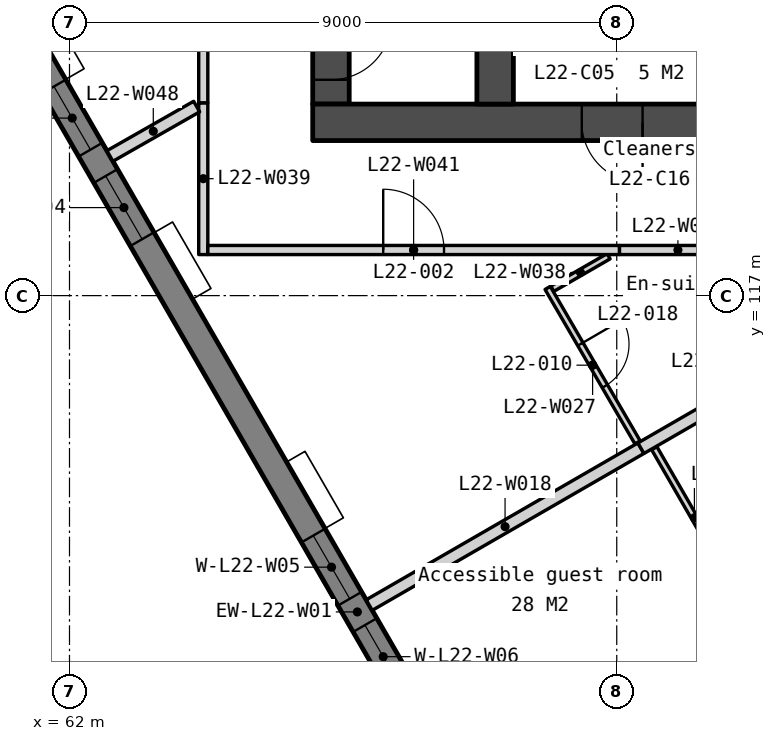
"""IFC4 building model, lengths in metres.
Left out: names, types, materials, properties, quantities, classifications, styles, units other than length and angle.
Written with IfcOpenShell. Run it as: python <this file> out.ifc"""

import sys

from ifc_helpers import new_model, si_unit, direction, frame, frame_2d, origin, place, context, subcontext, project, spatial, polyline, rectangle, outline, extrude, element, fill, save


model = new_model("IFC4")
c1 = context("Model", 3, precision=1e-05, world=origin(), true_north=direction((0.0, 1.0)))
c2 = subcontext(c1, "Body", "Model", "MODEL_VIEW")
j1 = project(units=[si_unit("LENGTHUNIT", "METRE"), si_unit("PLANEANGLEUNIT", "RADIAN")], contexts=[c1])
p1 = place(None, origin())
s1 = spatial("IfcSite", under=j1, at=p1, CompositionType="ELEMENT")
p2 = place(p1, origin())
s2 = spatial("IfcBuilding", under=s1, at=p2, CompositionType="ELEMENT")
p3 = place(p2, frame((0.0, 0.0, 92.3)))
s3 = spatial("IfcBuildingStorey", under=s2, at=p3, CompositionType="ELEMENT", Elevation=92.3)
p4 = place(p3, frame((66.3, 133.95, 0.0), z_axis=(0.0, 0.0, 1.0), x_axis=(0.0, -1.0, 0.0)))
e1 = element("IfcWall", 1, at=p4, inside=s3, PredefinedType="SOLIDWALL", context=c2, shape_type="SweptSolid", body=[
    extrude(rectangle(XDim=13.8, YDim=0.6, at=frame_2d((6.9, 0.0))), origin(), (0.0, 0.0, 1.0), 3.35),
])
p5 = place(p4, frame((0.6, 0.0, 0.0)))
e2 = element("IfcOpeningElement", 2, at=p5, cuts=e1, PredefinedType="OPENING", context=c2, shape_type="SweptSolid", body=[
    extrude(rectangle(XDim=1.1, YDim=2.1, at=frame_2d((0.55, 1.05))), frame((0.0, 0.31, 0.0), z_axis=(0.0, -1.0, 0.0), x_axis=(1.0, 0.0, 0.0)), (0.0, 0.0, 1.0), 0.62),
])
p6 = place(p4, frame((12.4, 0.0, 0.0)))
e3 = element("IfcOpeningElement", 3, at=p6, cuts=e1, PredefinedType="OPENING", context=c2, shape_type="SweptSolid", body=[
    extrude(rectangle(XDim=1.0, YDim=2.1, at=frame_2d((0.5, 1.05))), frame((0.0, 0.31, 0.0), z_axis=(0.0, -1.0, 0.0), x_axis=(1.0, 0.0, 0.0)), (0.0, 0.0, 1.0), 0.62),
])
p7 = place(p4, frame((8.5, 0.0, 0.0)))
e4 = element("IfcOpeningElement", 4, at=p7, cuts=e1, PredefinedType="OPENING", context=c2, shape_type="SweptSolid", body=[
    extrude(rectangle(XDim=1.0, YDim=2.1, at=frame_2d((0.5, 1.05))), frame((0.0, 0.31, 0.0), z_axis=(0.0, -1.0, 0.0), x_axis=(1.0, 0.0, 0.0)), (0.0, 0.0, 1.0), 0.62),
])
p8 = place(p4, frame((10.45, 0.0, 0.0)))
e5 = element("IfcOpeningElement", 5, at=p8, cuts=e1, PredefinedType="OPENING", context=c2, shape_type="SweptSolid", body=[
    extrude(rectangle(XDim=1.0, YDim=2.1, at=frame_2d((0.5, 1.05))), frame((0.0, 0.31, 0.0), z_axis=(0.0, -1.0, 0.0), x_axis=(1.0, 0.0, 0.0)), (0.0, 0.0, 1.0), 0.62),
])
p9 = place(p3, frame((66.0, 119.85, 0.0), z_axis=(0.0, 0.0, 1.0), x_axis=(1.0, 0.0, 0.0)))
e6 = element("IfcWall", 6, at=p9, inside=s3, PredefinedType="SOLIDWALL", context=c2, shape_type="SweptSolid", body=[
    extrude(rectangle(XDim=28.0, YDim=0.6, at=frame_2d((14.0, 0.0))), origin(), (0.0, 0.0, 1.0), 3.35),
])
p10 = place(p9, frame((6.825, 0.0, 0.0)))
e7 = element("IfcOpeningElement", 7, at=p10, cuts=e6, PredefinedType="OPENING", context=c2, shape_type="SweptSolid", body=[
    extrude(rectangle(XDim=1.8, YDim=2.1, at=frame_2d((0.9, 1.05))), frame((0.0, 0.31, 0.0), z_axis=(0.0, -1.0, 0.0), x_axis=(1.0, 0.0, 0.0)), (0.0, 0.0, 1.0), 0.62),
])
p11 = place(p9, frame((15.85, 0.0, 0.0)))
e8 = element("IfcOpeningElement", 8, at=p11, cuts=e6, PredefinedType="OPENING", context=c2, shape_type="SweptSolid", body=[
    extrude(rectangle(XDim=1.5, YDim=2.1, at=frame_2d((0.75, 1.05))), frame((0.0, 0.31, 0.0), z_axis=(0.0, -1.0, 0.0), x_axis=(1.0, 0.0, 0.0)), (0.0, 0.0, 1.0), 0.62),
])
p12 = place(p9, frame((19.375, 0.0, 0.0)))
e9 = element("IfcOpeningElement", 9, at=p12, cuts=e6, PredefinedType="OPENING", context=c2, shape_type="SweptSolid", body=[
    extrude(rectangle(XDim=1.8, YDim=2.1, at=frame_2d((0.9, 1.05))), frame((0.0, 0.31, 0.0), z_axis=(0.0, -1.0, 0.0), x_axis=(1.0, 0.0, 0.0)), (0.0, 0.0, 1.0), 0.62),
])
p13 = place(p9, frame((4.425, 0.0, 0.0)))
e10 = element("IfcOpeningElement", 10, at=p13, cuts=e6, PredefinedType="OPENING", context=c2, shape_type="SweptSolid", body=[
    extrude(rectangle(XDim=1.0, YDim=2.1, at=frame_2d((0.5, 1.05))), frame((0.0, 0.31, 0.0), z_axis=(0.0, -1.0, 0.0), x_axis=(1.0, 0.0, 0.0)), (0.0, 0.0, 1.0), 0.62),
])
p14 = place(p9, frame((9.925, 0.0, 0.0)))
e11 = element("IfcOpeningElement", 11, at=p14, cuts=e6, PredefinedType="OPENING", context=c2, shape_type="SweptSolid", body=[
    extrude(rectangle(XDim=1.0, YDim=2.1, at=frame_2d((0.5, 1.05))), frame((0.0, 0.31, 0.0), z_axis=(0.0, -1.0, 0.0), x_axis=(1.0, 0.0, 0.0)), (0.0, 0.0, 1.0), 0.62),
])
p15 = place(p9, frame((13.125, 0.0, 0.0)))
e12 = element("IfcOpeningElement", 12, at=p15, cuts=e6, PredefinedType="OPENING", context=c2, shape_type="SweptSolid", body=[
    extrude(rectangle(XDim=1.0, YDim=2.1, at=frame_2d((0.5, 1.05))), frame((0.0, 0.31, 0.0), z_axis=(0.0, -1.0, 0.0), x_axis=(1.0, 0.0, 0.0)), (0.0, 0.0, 1.0), 0.62),
])
p16 = place(p9, frame((21.725, 0.0, 0.0)))
e13 = element("IfcOpeningElement", 13, at=p16, cuts=e6, PredefinedType="OPENING", context=c2, shape_type="SweptSolid", body=[
    extrude(rectangle(XDim=1.0, YDim=2.1, at=frame_2d((0.5, 1.05))), frame((0.0, 0.31, 0.0), z_axis=(0.0, -1.0, 0.0), x_axis=(1.0, 0.0, 0.0)), (0.0, 0.0, 1.0), 0.62),
])
p17 = place(p9, frame((23.425, 0.0, 0.0)))
e14 = element("IfcOpeningElement", 14, at=p17, cuts=e6, PredefinedType="OPENING", context=c2, shape_type="SweptSolid", body=[
    extrude(rectangle(XDim=1.0, YDim=2.1, at=frame_2d((0.5, 1.05))), frame((0.0, 0.31, 0.0), z_axis=(0.0, -1.0, 0.0), x_axis=(1.0, 0.0, 0.0)), (0.0, 0.0, 1.0), 0.62),
])
p18 = place(p3, frame((69.0, 122.25, 0.0), z_axis=(0.0, 0.0, 1.0), x_axis=(0.0, -1.0, 0.0)))
e15 = element("IfcWall", 15, at=p18, inside=s3, PredefinedType="SOLIDWALL", context=c2, shape_type="SweptSolid", body=[
    extrude(rectangle(XDim=2.1, YDim=0.6, at=frame_2d((1.05, 0.0))), origin(), (0.0, 0.0, 1.0), 3.35),
])
p19 = place(p3, frame((56.073, 130.263, -0.15), z_axis=(0.0, 0.0, 1.0), x_axis=(0.500000478905, -0.866025127289, 0.0)))
e16 = element("IfcWall", 16, at=p19, inside=s3, PredefinedType="SOLIDWALL", context=c2, shape_type="SweptSolid", body=[
    extrude(outline(polyline([(42.643, 0.0), (42.643, 3.5), (0.0, 3.5), (0.0, 0.0), (42.643, 0.0)])), frame((0.0, 0.225, 0.0), z_axis=(0.0, -1.0, 0.0), x_axis=(1.0, 0.0, 0.0)), (0.0, 0.0, 1.0), 0.45),
])
p20 = place(p19, frame((2.814, 0.0, 1.05)))
e17 = element("IfcOpeningElement", 17, at=p20, cuts=e16, PredefinedType="OPENING", context=c2, shape_type="SweptSolid", body=[
    extrude(rectangle(XDim=1.2, YDim=1.5, at=frame_2d((0.6, 0.75))), frame((0.0, 0.235, 0.0), z_axis=(0.0, -1.0, 0.0), x_axis=(1.0, 0.0, 0.0)), (0.0, 0.0, 1.0), 0.47),
])
p21 = place(p19, frame((4.514, 0.0, 1.05)))
e18 = element("IfcOpeningElement", 18, at=p21, cuts=e16, PredefinedType="OPENING", context=c2, shape_type="SweptSolid", body=[
    extrude(rectangle(XDim=1.2, YDim=1.5, at=frame_2d((0.6, 0.75))), frame((0.0, 0.235, 0.0), z_axis=(0.0, -1.0, 0.0), x_axis=(1.0, 0.0, 0.0)), (0.0, 0.0, 1.0), 0.47),
])
p22 = place(p19, frame((11.343, 0.0, 1.05)))
e19 = element("IfcOpeningElement", 19, at=p22, cuts=e16, PredefinedType="OPENING", context=c2, shape_type="SweptSolid", body=[
    extrude(rectangle(XDim=1.2, YDim=1.5, at=frame_2d((0.6, 0.75))), frame((0.0, 0.235, 0.0), z_axis=(0.0, -1.0, 0.0), x_axis=(1.0, 0.0, 0.0)), (0.0, 0.0, 1.0), 0.47),
])
p23 = place(p19, frame((13.043, 0.0, 1.05)))
e20 = element("IfcOpeningElement", 20, at=p23, cuts=e16, PredefinedType="OPENING", context=c2, shape_type="SweptSolid", body=[
    extrude(rectangle(XDim=1.2, YDim=1.5, at=frame_2d((0.6, 0.75))), frame((0.0, 0.235, 0.0), z_axis=(0.0, -1.0, 0.0), x_axis=(1.0, 0.0, 0.0)), (0.0, 0.0, 1.0), 0.47),
])
p24 = place(p19, frame((19.872, 0.0, 1.05)))
e21 = element("IfcOpeningElement", 21, at=p24, cuts=e16, PredefinedType="OPENING", context=c2, shape_type="SweptSolid", body=[
    extrude(rectangle(XDim=1.2, YDim=1.5, at=frame_2d((0.6, 0.75))), frame((0.0, 0.235, 0.0), z_axis=(0.0, -1.0, 0.0), x_axis=(1.0, 0.0, 0.0)), (0.0, 0.0, 1.0), 0.47),
])
p25 = place(p19, frame((21.572, 0.0, 1.05)))
e22 = element("IfcOpeningElement", 22, at=p25, cuts=e16, PredefinedType="OPENING", context=c2, shape_type="SweptSolid", body=[
    extrude(rectangle(XDim=1.2, YDim=1.5, at=frame_2d((0.6, 0.75))), frame((0.0, 0.235, 0.0), z_axis=(0.0, -1.0, 0.0), x_axis=(1.0, 0.0, 0.0)), (0.0, 0.0, 1.0), 0.47),
])
p26 = place(p19, frame((28.4, 0.0, 1.05)))
e23 = element("IfcOpeningElement", 23, at=p26, cuts=e16, PredefinedType="OPENING", context=c2, shape_type="SweptSolid", body=[
    extrude(rectangle(XDim=1.2, YDim=1.5, at=frame_2d((0.6, 0.75))), frame((0.0, 0.235, 0.0), z_axis=(0.0, -1.0, 0.0), x_axis=(1.0, 0.0, 0.0)), (0.0, 0.0, 1.0), 0.47),
])
p27 = place(p19, frame((30.1, 0.0, 1.05)))
e24 = element("IfcOpeningElement", 24, at=p27, cuts=e16, PredefinedType="OPENING", context=c2, shape_type="SweptSolid", body=[
    extrude(rectangle(XDim=1.2, YDim=1.5, at=frame_2d((0.6, 0.75))), frame((0.0, 0.235, 0.0), z_axis=(0.0, -1.0, 0.0), x_axis=(1.0, 0.0, 0.0)), (0.0, 0.0, 1.0), 0.47),
])
p28 = place(p19, frame((36.929, 0.0, 1.05)))
e25 = element("IfcOpeningElement", 25, at=p28, cuts=e16, PredefinedType="OPENING", context=c2, shape_type="SweptSolid", body=[
    extrude(rectangle(XDim=1.2, YDim=1.5, at=frame_2d((0.6, 0.75))), frame((0.0, 0.235, 0.0), z_axis=(0.0, -1.0, 0.0), x_axis=(1.0, 0.0, 0.0)), (0.0, 0.0, 1.0), 0.47),
])
p29 = place(p19, frame((38.629, 0.0, 1.05)))
e26 = element("IfcOpeningElement", 26, at=p29, cuts=e16, PredefinedType="OPENING", context=c2, shape_type="SweptSolid", body=[
    extrude(rectangle(XDim=1.2, YDim=1.5, at=frame_2d((0.6, 0.75))), frame((0.0, 0.235, 0.0), z_axis=(0.0, -1.0, 0.0), x_axis=(1.0, 0.0, 0.0)), (0.0, 0.0, 1.0), 0.47),
])
p30 = place(p3, frame((66.929, 111.91, 0.0), z_axis=(0.0, 0.0, 1.0), x_axis=(0.866021702275, 0.500006411147, 0.0)))
e27 = element("IfcWall", 27, at=p30, inside=s3, PredefinedType="PARTITIONING", context=c2, shape_type="SweptSolid", body=[
    extrude(rectangle(XDim=5.16, YDim=0.2, at=frame_2d((2.58, 0.0))), origin(), (0.0, 0.0, 1.0), 3.35),
])
p31 = place(p3, frame((71.617, 114.49, 0.0), z_axis=(0.0, 0.0, 1.0), x_axis=(0.500007957085, -0.86602080971, 0.0)))
e28 = element("IfcWall", 28, at=p31, inside=s3, PredefinedType="PARTITIONING", context=c2, shape_type="SweptSolid", body=[
    extrude(rectangle(XDim=2.64, YDim=0.1, at=frame_2d((1.32, 0.0))), origin(), (0.0, 0.0, 1.0), 3.35),
])
p32 = place(p3, frame((69.864, 117.126, 0.0), z_axis=(0.0, 0.0, 1.0), x_axis=(0.502920651267, -0.864332585599, 0.0)))
e29 = element("IfcWall", 29, at=p32, inside=s3, PredefinedType="PARTITIONING", context=c2, shape_type="SweptSolid", body=[
    extrude(rectangle(XDim=2.94, YDim=0.1, at=frame_2d((1.47, 0.0))), origin(), (0.0, 0.0, 1.0), 3.35),
])
p33 = place(p32, frame((1.07, 0.0, 0.0)))
e30 = element("IfcOpeningElement", 30, at=p33, cuts=e29, PredefinedType="OPENING", context=c2, shape_type="SweptSolid", body=[
    extrude(rectangle(XDim=0.8, YDim=2.1, at=frame_2d((0.4, 1.05))), frame((0.0, 0.06, 0.0), z_axis=(0.0, -1.0, 0.0), x_axis=(1.0, 0.0, 0.0)), (0.0, 0.0, 1.0), 0.12),
])
p34 = place(p3, frame((71.398, 114.49, 0.0), z_axis=(0.0, 0.0, 1.0), x_axis=(0.866026028799, 0.499998917442, 0.0)))
e31 = element("IfcWall", 31, at=p34, inside=s3, PredefinedType="PARTITIONING", context=c2, shape_type="SweptSolid", body=[
    extrude(rectangle(XDim=2.905, YDim=0.2, at=frame_2d((1.452, 0.0))), origin(), (0.0, 0.0, 1.0), 3.35),
])
p35 = place(p3, frame((69.941, 117.113, 0.0), z_axis=(0.0, 0.0, 1.0), x_axis=(0.866040989419, 0.499973003918, 0.0)))
e32 = element("IfcWall", 32, at=p35, inside=s3, PredefinedType="PARTITIONING", context=c2, shape_type="SweptSolid", body=[
    extrude(rectangle(XDim=1.068, YDim=0.1, at=frame_2d((0.534, 0.0))), origin(), (0.0, 0.0, 1.0), 3.35),
])
p36 = place(p3, frame((64.2, 117.675, 0.0), z_axis=(0.0, 0.0, 1.0), x_axis=(0.0, 1.0, 0.0)))
e33 = element("IfcWall", 33, at=p36, inside=s3, PredefinedType="PARTITIONING", context=c2, shape_type="SweptSolid", body=[
    extrude(rectangle(XDim=2.496, YDim=0.15, at=frame_2d((1.248, 0.0))), origin(), (0.0, 0.0, 1.0), 3.35),
])
p37 = place(p3, frame((71.044, 117.75, 0.0), z_axis=(0.0, 0.0, 1.0), x_axis=(1.0, 0.0, 0.0)))
e34 = element("IfcWall", 34, at=p37, inside=s3, PredefinedType="PARTITIONING", context=c2, shape_type="SweptSolid", body=[
    extrude(rectangle(XDim=1.925, YDim=0.15, at=frame_2d((0.962, 0.0))), origin(), (0.0, 0.0, 1.0), 3.35),
])
p38 = place(p3, frame((64.275, 117.75, 0.0), z_axis=(0.0, 0.0, 1.0), x_axis=(1.0, 0.0, 0.0)))
e35 = element("IfcWall", 35, at=p38, inside=s3, PredefinedType="PARTITIONING", context=c2, shape_type="SweptSolid", body=[
    extrude(rectangle(XDim=6.769, YDim=0.15, at=frame_2d((3.384, 0.0))), origin(), (0.0, 0.0, 1.0), 3.35),
])
p39 = place(p38, frame((2.884, 0.0, 0.0)))
e36 = element("IfcOpeningElement", 36, at=p39, cuts=e35, PredefinedType="OPENING", context=c2, shape_type="SweptSolid", body=[
    extrude(rectangle(XDim=1.0, YDim=2.1, at=frame_2d((0.5, 1.05))), frame((0.0, 0.085, 0.0), z_axis=(0.0, -1.0, 0.0), x_axis=(1.0, 0.0, 0.0)), (0.0, 0.0, 1.0), 0.17),
])
p40 = place(p3, frame((62.665, 119.296, 0.0), z_axis=(0.0, 0.0, 1.0), x_axis=(0.868846341096, 0.495081847339, 0.0)))
e37 = element("IfcWall", 37, at=p40, inside=s3, PredefinedType="PARTITIONING", context=c2, shape_type="SweptSolid", body=[
    extrude(rectangle(XDim=1.642, YDim=0.2, at=frame_2d((0.821, 0.0))), origin(), (0.0, 0.0, 1.0), 3.35),
])
p41 = place(p3, frame((64.2, 120.171, 0.0), z_axis=(0.0, 0.0, 1.0), x_axis=(0.0, 1.0, 0.0)))
e38 = element("IfcWall", 38, at=p41, inside=s3, PredefinedType="PARTITIONING", context=c2, shape_type="SweptSolid", body=[
    extrude(rectangle(XDim=6.404, YDim=0.15, at=frame_2d((3.202, 0.0))), origin(), (0.0, 0.0, 1.0), 3.35),
])
p42 = place(p41, frame((2.752, 0.0, 0.0)))
e39 = element("IfcOpeningElement", 39, at=p42, cuts=e38, PredefinedType="OPENING", context=c2, shape_type="SweptSolid", body=[
    extrude(rectangle(XDim=0.9, YDim=2.1, at=frame_2d((0.45, 1.05))), frame((0.0, 0.085, 0.0), z_axis=(0.0, -1.0, 0.0), x_axis=(1.0, 0.0, 0.0)), (0.0, 0.0, 1.0), 0.17),
])
p43 = place(p13, origin())
e40 = element("IfcDoor", 40, at=p43, inside=s3, OperationType="SINGLE_SWING_RIGHT", PredefinedType="DOOR", context=c2, shape_type="SweptSolid", body=[
    extrude(rectangle(XDim=1.0, YDim=2.1, at=frame_2d((0.5, 1.05))), frame((0.0, 0.025, 0.0), z_axis=(0.0, -1.0, 0.0), x_axis=(1.0, 0.0, 0.0)), (0.0, 0.0, 1.0), 0.05),
])
fill(e10, e40)
p44 = place(p6, origin())
e41 = element("IfcDoor", 41, at=p44, inside=s3, OperationType="SINGLE_SWING_LEFT", PredefinedType="DOOR", context=c2, shape_type="SweptSolid", body=[
    extrude(rectangle(XDim=1.0, YDim=2.1, at=frame_2d((0.5, 1.05))), frame((0.0, 0.025, 0.0), z_axis=(0.0, -1.0, 0.0), x_axis=(1.0, 0.0, 0.0)), (0.0, 0.0, 1.0), 0.05),
])
fill(e3, e41)
p45 = place(p22, origin())
e42 = element("IfcWindow", 42, at=p45, inside=s3, PartitioningType="SINGLE_PANEL", PredefinedType="WINDOW", context=c2, shape_type="SweptSolid", body=[
    extrude(rectangle(XDim=1.2, YDim=1.5, at=frame_2d((0.6, 0.75))), frame((0.0, 0.03, 0.0), z_axis=(0.0, -1.0, 0.0), x_axis=(1.0, 0.0, 0.0)), (0.0, 0.0, 1.0), 0.06),
])
fill(e19, e42)
p46 = place(p23, origin())
e43 = element("IfcWindow", 43, at=p46, inside=s3, PartitioningType="SINGLE_PANEL", PredefinedType="WINDOW", context=c2, shape_type="SweptSolid", body=[
    extrude(rectangle(XDim=1.2, YDim=1.5, at=frame_2d((0.6, 0.75))), frame((0.0, 0.03, 0.0), z_axis=(0.0, -1.0, 0.0), x_axis=(1.0, 0.0, 0.0)), (0.0, 0.0, 1.0), 0.06),
])
fill(e20, e43)
p47 = place(p24, origin())
e44 = element("IfcWindow", 44, at=p47, inside=s3, PartitioningType="SINGLE_PANEL", PredefinedType="WINDOW", context=c2, shape_type="SweptSolid", body=[
    extrude(rectangle(XDim=1.2, YDim=1.5, at=frame_2d((0.6, 0.75))), frame((0.0, 0.03, 0.0), z_axis=(0.0, -1.0, 0.0), x_axis=(1.0, 0.0, 0.0)), (0.0, 0.0, 1.0), 0.06),
])
fill(e21, e44)
p48 = place(p25, origin())
e45 = element("IfcWindow", 45, at=p48, inside=s3, PartitioningType="SINGLE_PANEL", PredefinedType="WINDOW", context=c2, shape_type="SweptSolid", body=[
    extrude(rectangle(XDim=1.2, YDim=1.5, at=frame_2d((0.6, 0.75))), frame((0.0, 0.03, 0.0), z_axis=(0.0, -1.0, 0.0), x_axis=(1.0, 0.0, 0.0)), (0.0, 0.0, 1.0), 0.06),
])
fill(e22, e45)
p49 = place(p39, origin())
e46 = element("IfcDoor", 46, at=p49, inside=s3, OperationType="SINGLE_SWING_LEFT", PredefinedType="DOOR", context=c2, shape_type="SweptSolid", body=[
    extrude(rectangle(XDim=1.0, YDim=2.1, at=frame_2d((0.5, 1.05))), frame((0.0, 0.025, 0.0), z_axis=(0.0, -1.0, 0.0), x_axis=(1.0, 0.0, 0.0)), (0.0, 0.0, 1.0), 0.05),
])
fill(e36, e46)
p50 = place(p33, origin())
e47 = element("IfcDoor", 47, at=p50, inside=s3, OperationType="SINGLE_SWING_LEFT", PredefinedType="DOOR", context=c2, shape_type="SweptSolid", body=[
    extrude(rectangle(XDim=0.8, YDim=2.1, at=frame_2d((0.4, 1.05))), frame((0.0, 0.025, 0.0), z_axis=(0.0, -1.0, 0.0), x_axis=(1.0, 0.0, 0.0)), (0.0, 0.0, 1.0), 0.05),
])
fill(e30, e47)
save(model, sys.argv[1])
